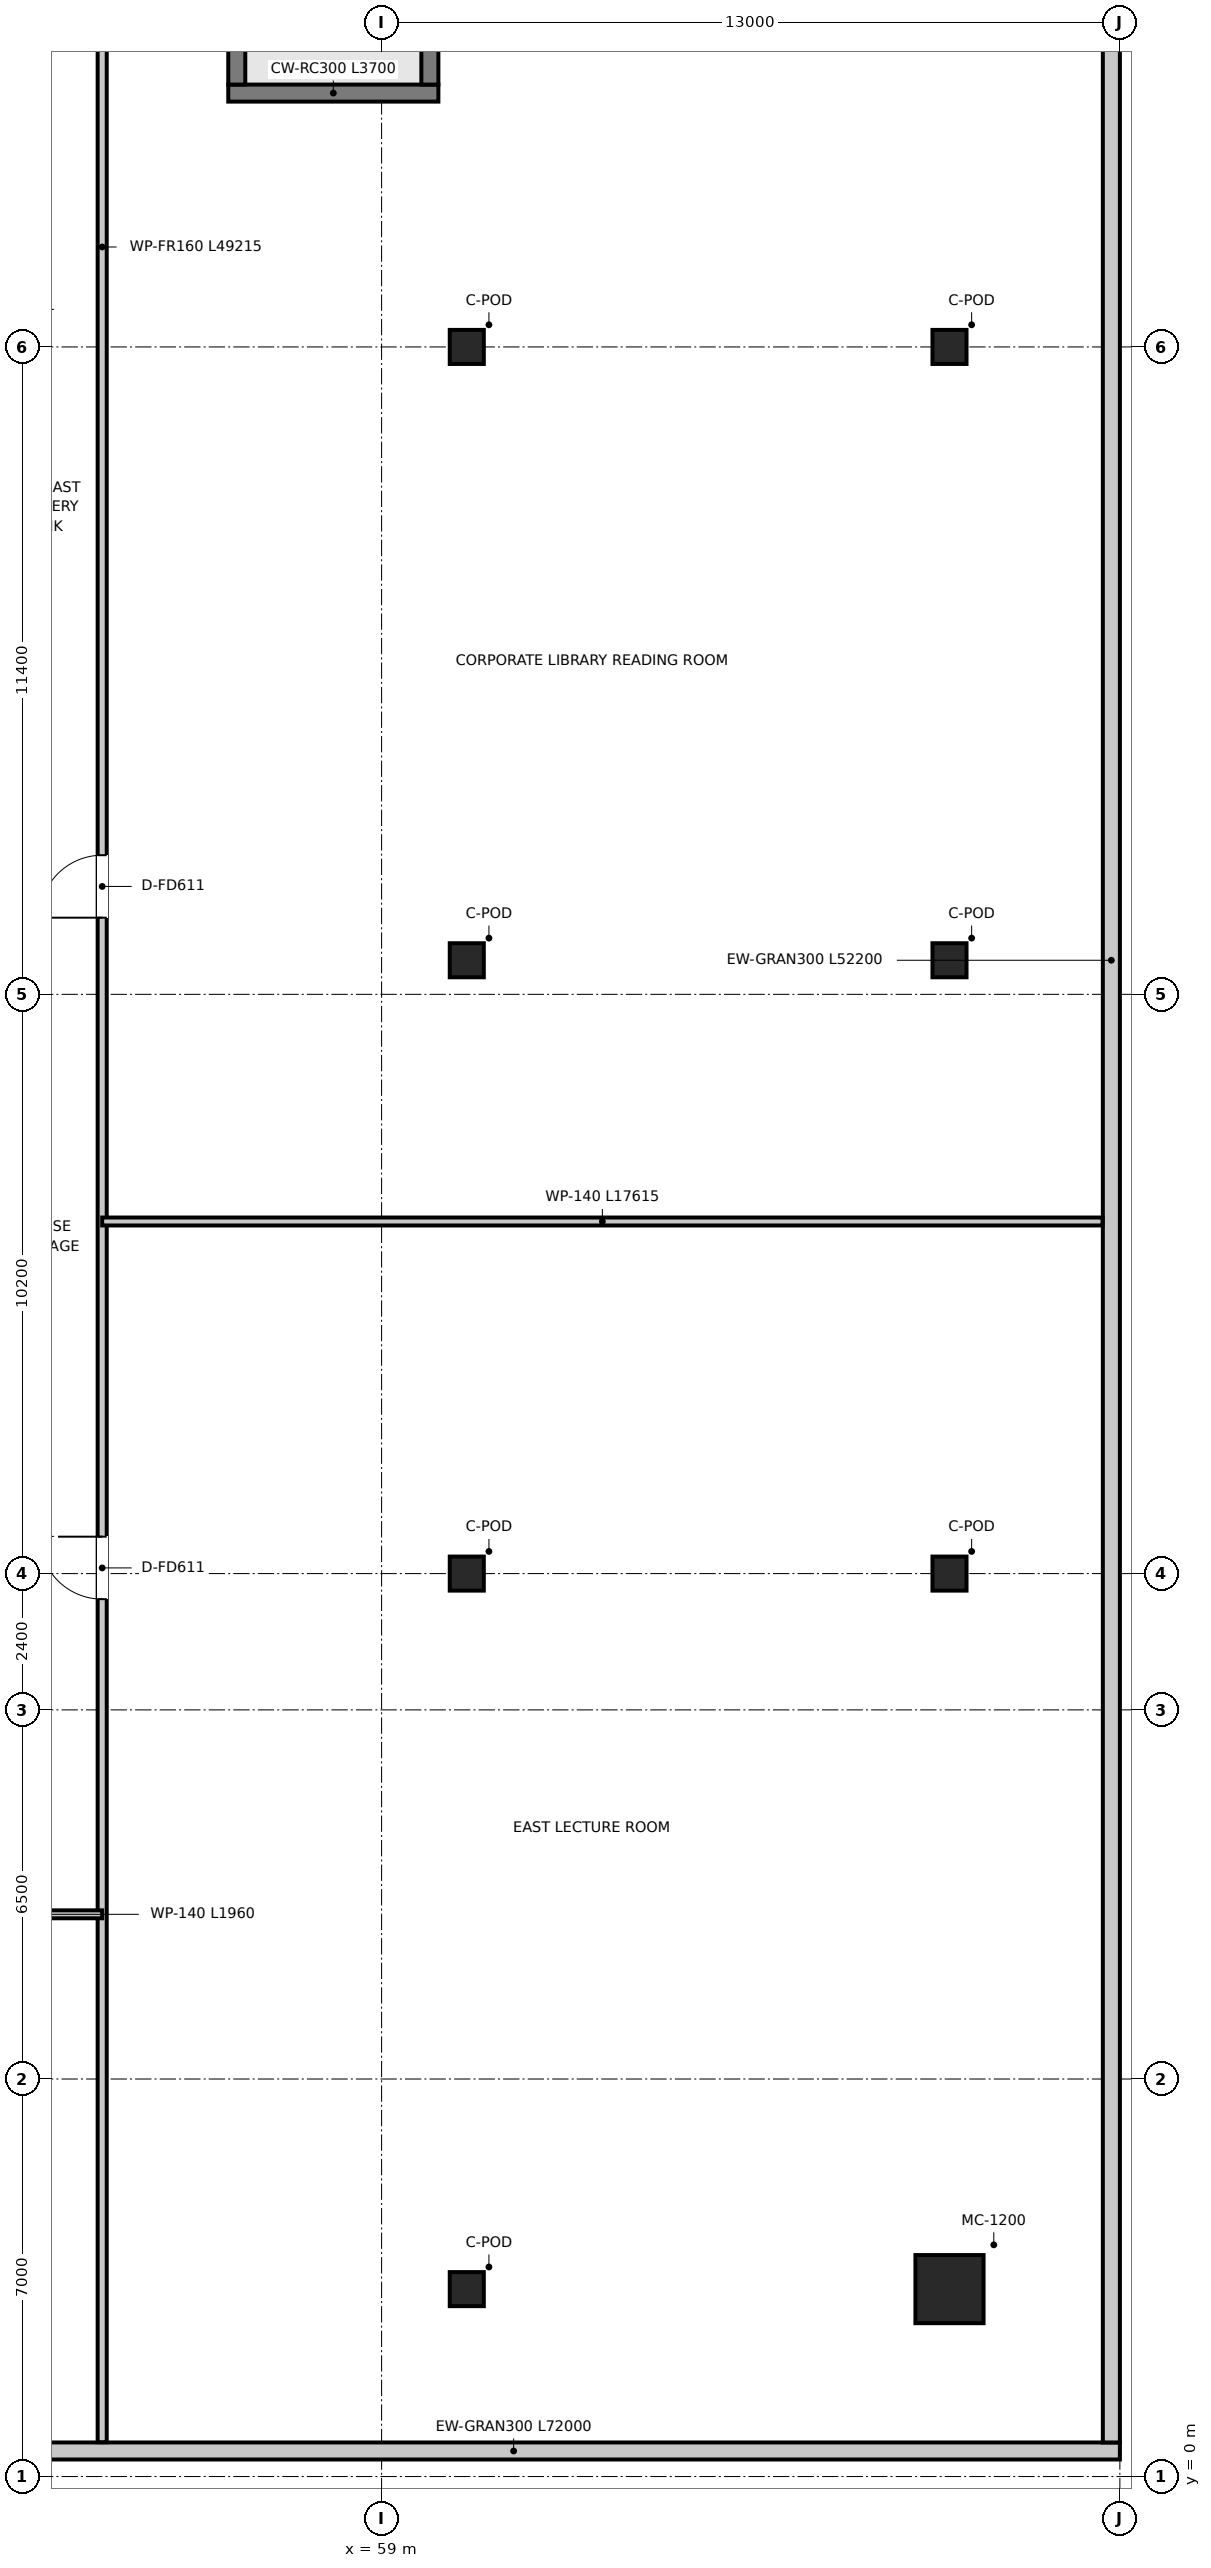
"""IFC4 building model, lengths in metres.
Left out: names, types, materials, properties, quantities, classifications, styles, units other than length and angle.
Written with IfcOpenShell. Run it as: python <this file> out.ifc"""

import sys

from ifc_helpers import new_model, si_unit, direction, frame, frame_2d, origin, origin_2d, place, context, subcontext, project, spatial, rectangle, extrude, source, transform, mapped, element, fill, save


model = new_model("IFC4")
c1 = context("Model", 3, precision=1e-05, world=origin(), true_north=direction((0.0, 1.0)))
c2 = subcontext(c1, "Body", "Model", "MODEL_VIEW")
j1 = project(units=[si_unit("LENGTHUNIT", "METRE"), si_unit("PLANEANGLEUNIT", "RADIAN")], contexts=[c1])
p1 = place(None, origin())
s1 = spatial("IfcSite", under=j1, at=p1, CompositionType="ELEMENT")
p2 = place(p1, origin())
s2 = spatial("IfcBuilding", under=s1, at=p2, CompositionType="ELEMENT")
p3 = place(p2, frame((0.0, 0.0, 10.4)))
s3 = spatial("IfcBuildingStorey", under=s2, at=p3, CompositionType="ELEMENT", Elevation=10.4)
p4 = place(p3, frame((56.3, 41.97, 0.0), z_axis=(0.0, 0.0, 1.0), x_axis=(1.0, 0.0, 0.0)))
e1 = element("IfcWall", 1, at=p4, inside=s3, PredefinedType="SHEAR", context=c2, shape_type="SweptSolid", body=[
    extrude(rectangle(XDim=3.7, YDim=0.3, at=frame_2d((1.85, 0.0))), origin(), (0.0, 0.0, 1.0), 5.0),
])
for number, where, z_axis, x_axis in (
    (2, (56.45, 42.12, 0.0), (0.0, 0.0, 1.0), (0.0, 1.0, 0.0)),
    (3, (59.85, 42.12, 0.0), (0.0, 0.0, 1.0), (0.0, 1.0, 0.0)),
):
    element("IfcWall", number, at=place(p3, frame(where, z_axis=z_axis, x_axis=x_axis)), inside=s3, PredefinedType="SHEAR", context=c2, shape_type="SweptSolid", body=[
        extrude(rectangle(XDim=7.48, YDim=0.3, at=frame_2d((3.74, 0.0))), origin(), (0.0, 0.0, 1.0), 5.0),
    ])
m1 = source(origin(), c2, "Body", "SweptSolid", [
    extrude(rectangle(XDim=1.2, YDim=1.2, at=origin_2d()), origin(), (0.0, 0.0, 1.0), 5.0),
])
p5 = place(p3, frame((69.0, 3.3, 0.0), z_axis=(0.0, 0.0, 1.0), x_axis=(1.0, 0.0, 0.0)))
e4 = element("IfcColumn", 4, at=p5, inside=s3, PredefinedType="USERDEFINED", context=c2, shape_type="MappedRepresentation", body=[
    mapped(m1, transform((0.0, 0.0, 0.0), x_axis=(1.0, 0.0, 0.0), y_axis=(0.0, 1.0, 0.0), z_axis=(0.0, 0.0, 1.0), scale=1.0)),
])
m2 = source(origin(), c2, "Body", "SweptSolid", [
    extrude(rectangle(XDim=0.6, YDim=0.6, at=origin_2d()), origin(), (0.0, 0.0, 1.0), 5.0),
])
for number, where, z_axis, x_axis in (
    (5, (69.0, 15.9, 0.0), (0.0, 0.0, 1.0), (1.0, 0.0, 0.0)),
    (6, (69.0, 26.7, 0.0), (0.0, 0.0, 1.0), (1.0, 0.0, 0.0)),
    (7, (69.0, 37.5, 0.0), (0.0, 0.0, 1.0), (1.0, 0.0, 0.0)),
    (8, (60.5, 15.9, 0.0), (0.0, 0.0, 1.0), (1.0, 0.0, 0.0)),
    (9, (60.5, 26.7, 0.0), (0.0, 0.0, 1.0), (1.0, 0.0, 0.0)),
    (10, (60.5, 37.5, 0.0), (0.0, 0.0, 1.0), (1.0, 0.0, 0.0)),
    (11, (60.5, 3.3, 0.0), (0.0, 0.0, 1.0), (1.0, 0.0, 0.0)),
):
    element("IfcColumn", number, at=place(p3, frame(where, z_axis=z_axis, x_axis=x_axis)), inside=s3, PredefinedType="COLUMN", context=c2, shape_type="MappedRepresentation", body=[
        mapped(m2, transform((0.0, 0.0, 0.0), x_axis=(1.0, 0.0, 0.0), y_axis=(0.0, 1.0, 0.0), z_axis=(0.0, 0.0, 1.0), scale=1.0)),
    ])
p6 = place(p3, frame((72.0, 0.45, 0.0), z_axis=(0.0, 0.0, 1.0), x_axis=(-1.0, 0.0, 0.0)))
e12 = element("IfcWall", 12, at=p6, inside=s3, PredefinedType="SOLIDWALL", context=c2, shape_type="SweptSolid", body=[
    extrude(rectangle(XDim=72.0, YDim=0.3, at=frame_2d((36.0, 0.0))), origin(), (0.0, 0.0, 1.0), 4.7),
])
p7 = place(p6, frame((54.5, 0.0, 1.0)))
e13 = element("IfcOpeningElement", 13, at=p7, cuts=e12, PredefinedType="OPENING", context=c2, shape_type="SweptSolid", body=[
    extrude(rectangle(XDim=2.1, YDim=2.2, at=frame_2d((1.05, 1.1))), frame((0.0, 0.16, 0.0), z_axis=(0.0, -1.0, 0.0), x_axis=(1.0, 0.0, 0.0)), (0.0, 0.0, 1.0), 0.32),
])
p8 = place(p6, frame((45.5, 0.0, 1.05)))
e14 = element("IfcOpeningElement", 14, at=p8, cuts=e12, PredefinedType="OPENING", context=c2, shape_type="SweptSolid", body=[
    extrude(rectangle(XDim=1.6, YDim=2.0, at=frame_2d((0.8, 1.0))), frame((0.0, 0.16, 0.0), z_axis=(0.0, -1.0, 0.0), x_axis=(1.0, 0.0, 0.0)), (0.0, 0.0, 1.0), 0.32),
])
p9 = place(p6, frame((39.0, 0.0, 1.2)))
e15 = element("IfcOpeningElement", 15, at=p9, cuts=e12, PredefinedType="OPENING", context=c2, shape_type="SweptSolid", body=[
    extrude(rectangle(XDim=1.8, YDim=1.6, at=frame_2d((0.9, 0.8))), frame((0.0, 0.16, 0.0), z_axis=(0.0, -1.0, 0.0), x_axis=(1.0, 0.0, 0.0)), (0.0, 0.0, 1.0), 0.32),
])
p10 = place(p6, frame((31.0, 0.0, 1.2)))
e16 = element("IfcOpeningElement", 16, at=p10, cuts=e12, PredefinedType="OPENING", context=c2, shape_type="SweptSolid", body=[
    extrude(rectangle(XDim=1.4, YDim=1.6, at=frame_2d((0.7, 0.8))), frame((0.0, 0.16, 0.0), z_axis=(0.0, -1.0, 0.0), x_axis=(1.0, 0.0, 0.0)), (0.0, 0.0, 1.0), 0.32),
])
p11 = place(p6, frame((21.5, 0.0, 1.25)))
e17 = element("IfcOpeningElement", 17, at=p11, cuts=e12, PredefinedType="OPENING", context=c2, shape_type="SweptSolid", body=[
    extrude(rectangle(XDim=1.1, YDim=1.5, at=frame_2d((0.55, 0.75))), frame((0.0, 0.16, 0.0), z_axis=(0.0, -1.0, 0.0), x_axis=(1.0, 0.0, 0.0)), (0.0, 0.0, 1.0), 0.32),
])
p12 = place(p3, frame((71.85, 52.8, 0.0), z_axis=(0.0, 0.0, 1.0), x_axis=(0.0, -1.0, 0.0)))
e18 = element("IfcWall", 18, at=p12, inside=s3, PredefinedType="SOLIDWALL", context=c2, shape_type="SweptSolid", body=[
    extrude(rectangle(XDim=52.2, YDim=0.3, at=frame_2d((26.1, 0.0))), origin(), (0.0, 0.0, 1.0), 4.7),
])
p13 = place(p3, frame((54.08, 0.605, 0.0), z_axis=(0.0, 0.0, 1.0), x_axis=(0.0, 1.0, 0.0)))
e19 = element("IfcWall", 19, at=p13, inside=s3, PredefinedType="PARTITIONING", context=c2, shape_type="SweptSolid", body=[
    extrude(rectangle(XDim=49.215, YDim=0.16, at=frame_2d((24.607, 0.0))), origin(), (0.0, 0.0, 1.0), 4.06),
])
p14 = place(p13, frame((14.845, 0.0, 0.0)))
e20 = element("IfcOpeningElement", 20, at=p14, cuts=e19, PredefinedType="OPENING", context=c2, shape_type="SweptSolid", body=[
    extrude(rectangle(XDim=1.1, YDim=2.15, at=frame_2d((0.55, 1.075))), frame((0.0, 0.09, 0.0), z_axis=(0.0, -1.0, 0.0), x_axis=(1.0, 0.0, 0.0)), (0.0, 0.0, 1.0), 0.18),
])
p15 = place(p13, frame((26.845, 0.0, 0.0)))
e21 = element("IfcOpeningElement", 21, at=p15, cuts=e19, PredefinedType="OPENING", context=c2, shape_type="SweptSolid", body=[
    extrude(rectangle(XDim=1.1, YDim=2.15, at=frame_2d((0.55, 1.075))), frame((0.0, 0.09, 0.0), z_axis=(0.0, -1.0, 0.0), x_axis=(1.0, 0.0, 0.0)), (0.0, 0.0, 1.0), 0.18),
])
p16 = place(p3, frame((52.12, 9.9, 0.0), z_axis=(0.0, 0.0, 1.0), x_axis=(1.0, 0.0, 0.0)))
e22 = element("IfcWall", 22, at=p16, inside=s3, PredefinedType="PARTITIONING", context=c2, shape_type="SweptSolid", body=[
    extrude(rectangle(XDim=1.96, YDim=0.14, at=frame_2d((0.98, 0.0))), origin(), (0.0, 0.0, 1.0), 4.7),
])
p17 = place(p3, frame((54.08, 22.1, 0.0), z_axis=(0.0, 0.0, 1.0), x_axis=(1.0, 0.0, 0.0)))
e23 = element("IfcWall", 23, at=p17, inside=s3, PredefinedType="PARTITIONING", context=c2, shape_type="SweptSolid", body=[
    extrude(rectangle(XDim=17.615, YDim=0.14, at=frame_2d((8.808, 0.0))), origin(), (0.0, 0.0, 1.0), 4.01),
])
p18 = place(p14, origin())
e24 = element("IfcDoor", 24, at=p18, inside=s3, OperationType="SINGLE_SWING_RIGHT", PredefinedType="DOOR", context=c2, shape_type="SweptSolid", body=[
    extrude(rectangle(XDim=1.1, YDim=2.15, at=frame_2d((0.55, 1.075))), frame((0.0, 0.025, 0.0), z_axis=(0.0, -1.0, 0.0), x_axis=(1.0, 0.0, 0.0)), (0.0, 0.0, 1.0), 0.05),
])
fill(e20, e24)
p19 = place(p15, origin())
e25 = element("IfcDoor", 25, at=p19, inside=s3, OperationType="SINGLE_SWING_LEFT", PredefinedType="DOOR", context=c2, shape_type="SweptSolid", body=[
    extrude(rectangle(XDim=1.1, YDim=2.15, at=frame_2d((0.55, 1.075))), frame((0.0, 0.025, 0.0), z_axis=(0.0, -1.0, 0.0), x_axis=(1.0, 0.0, 0.0)), (0.0, 0.0, 1.0), 0.05),
])
fill(e21, e25)
save(model, sys.argv[1])
